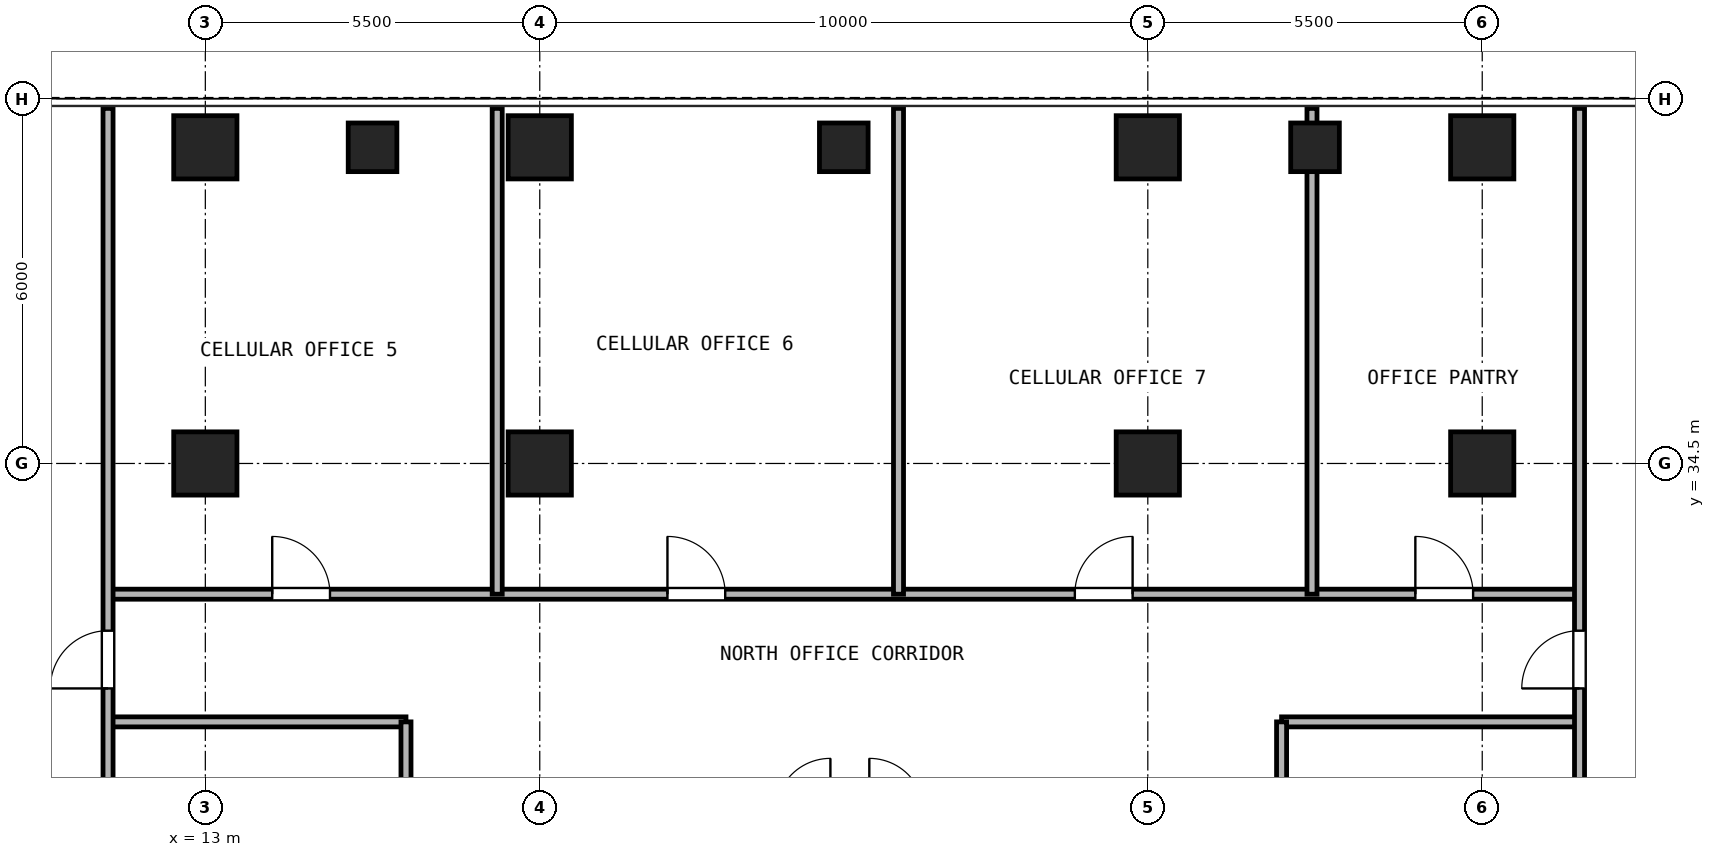
"""IFC4 building model, lengths in metres.
Left out: names, types, materials, properties, quantities, classifications, styles, units other than length and angle.
Written with IfcOpenShell. Run it as: python <this file> out.ifc"""

import sys

from ifc_helpers import new_model, si_unit, direction, frame, frame_2d, origin, origin_2d, place, context, subcontext, project, spatial, rectangle, hollow_rectangle, extrude, source, transform, mapped, element, fill, save


model = new_model("IFC4")
c1 = context("Model", 3, precision=1e-05, world=origin(), true_north=direction((0.0, 1.0)))
c2 = subcontext(c1, "Body", "Model", "MODEL_VIEW")
j1 = project(units=[si_unit("LENGTHUNIT", "METRE"), si_unit("PLANEANGLEUNIT", "RADIAN")], contexts=[c1])
p1 = place(None, origin())
s1 = spatial("IfcSite", under=j1, at=p1, CompositionType="ELEMENT")
p2 = place(p1, origin())
s2 = spatial("IfcBuilding", under=s1, at=p2, CompositionType="ELEMENT")
p3 = place(p2, frame((0.0, 0.0, 33.3)))
s3 = spatial("IfcBuildingStorey", under=s2, at=p3, CompositionType="ELEMENT", Elevation=33.3)
m1 = source(origin(), c2, "Body", "SweptSolid", [
    extrude(hollow_rectangle(XDim=1.04, YDim=1.04, WallThickness=0.065, at=origin_2d()), origin(), (0.0, 0.0, 1.0), 3.32),
])
for number, where, z_axis, x_axis in (
    (1, (13.0, 39.7, 0.0), (0.0, 0.0, 1.0), (1.0, 0.0, 0.0)),
    (2, (18.5, 39.7, 0.0), (0.0, 0.0, 1.0), (1.0, 0.0, 0.0)),
    (3, (28.5, 39.7, 0.0), (0.0, 0.0, 1.0), (1.0, 0.0, 0.0)),
    (4, (34.0, 39.7, 0.0), (0.0, 0.0, 1.0), (1.0, 0.0, 0.0)),
    (5, (13.0, 34.5, 0.0), (0.0, 0.0, 1.0), (1.0, 0.0, 0.0)),
    (6, (18.5, 34.5, 0.0), (0.0, 0.0, 1.0), (1.0, 0.0, 0.0)),
    (7, (28.5, 34.5, 0.0), (0.0, 0.0, 1.0), (1.0, 0.0, 0.0)),
    (8, (34.0, 34.5, 0.0), (0.0, 0.0, 1.0), (1.0, 0.0, 0.0)),
):
    element("IfcColumn", number, at=place(p3, frame(where, z_axis=z_axis, x_axis=x_axis)), inside=s3, PredefinedType="COLUMN", context=c2, shape_type="MappedRepresentation", body=[
        mapped(m1, transform((0.0, 0.0, 0.0), x_axis=(1.0, 0.0, 0.0), y_axis=(0.0, 1.0, 0.0), z_axis=(0.0, 0.0, 1.0), scale=1.0)),
    ])
m2 = source(origin(), c2, "Body", "SweptSolid", [
    extrude(hollow_rectangle(XDim=0.8, YDim=0.8, WallThickness=0.045, at=origin_2d()), origin(), (0.0, 0.0, 1.0), 3.32),
])
for number, where, z_axis, x_axis in (
    (9, (15.75, 39.7, 0.0), (0.0, 0.0, 1.0), (1.0, 0.0, 0.0)),
    (10, (23.5, 39.7, 0.0), (0.0, 0.0, 1.0), (1.0, 0.0, 0.0)),
    (11, (31.25, 39.7, 0.0), (0.0, 0.0, 1.0), (1.0, 0.0, 0.0)),
):
    element("IfcColumn", number, at=place(p3, frame(where, z_axis=z_axis, x_axis=x_axis)), inside=s3, PredefinedType="COLUMN", context=c2, shape_type="MappedRepresentation", body=[
        mapped(m2, transform((0.0, 0.0, 0.0), x_axis=(1.0, 0.0, 0.0), y_axis=(0.0, 1.0, 0.0), z_axis=(0.0, 0.0, 1.0), scale=1.0)),
    ])
p4 = place(p3, frame((11.4, 32.35, 0.0), z_axis=(0.0, 0.0, 1.0), x_axis=(1.0, 0.0, 0.0)))
e12 = element("IfcWall", 12, at=p4, inside=s3, PredefinedType="PARTITIONING", context=c2, shape_type="SweptSolid", body=[
    extrude(rectangle(XDim=24.2, YDim=0.165, at=frame_2d((12.1, 0.0))), origin(), (0.0, 0.0, 1.0), 3.32),
])
p5 = place(p4, frame((2.7, 0.0, 0.0)))
e13 = element("IfcOpeningElement", 13, at=p5, cuts=e12, PredefinedType="OPENING", context=c2, shape_type="SweptSolid", body=[
    extrude(rectangle(XDim=0.95, YDim=2.15, at=frame_2d((0.475, 1.075))), frame((0.0, 0.093, 0.0), z_axis=(0.0, -1.0, 0.0), x_axis=(1.0, 0.0, 0.0)), (0.0, 0.0, 1.0), 0.185),
])
p6 = place(p4, frame((9.2, 0.0, 0.0)))
e14 = element("IfcOpeningElement", 14, at=p6, cuts=e12, PredefinedType="OPENING", context=c2, shape_type="SweptSolid", body=[
    extrude(rectangle(XDim=0.95, YDim=2.15, at=frame_2d((0.475, 1.075))), frame((0.0, 0.093, 0.0), z_axis=(0.0, -1.0, 0.0), x_axis=(1.0, 0.0, 0.0)), (0.0, 0.0, 1.0), 0.185),
])
p7 = place(p4, frame((15.9, 0.0, 0.0)))
e15 = element("IfcOpeningElement", 15, at=p7, cuts=e12, PredefinedType="OPENING", context=c2, shape_type="SweptSolid", body=[
    extrude(rectangle(XDim=0.95, YDim=2.15, at=frame_2d((0.475, 1.075))), frame((0.0, 0.093, 0.0), z_axis=(0.0, -1.0, 0.0), x_axis=(1.0, 0.0, 0.0)), (0.0, 0.0, 1.0), 0.185),
])
p8 = place(p4, frame((21.5, 0.0, 0.0)))
e16 = element("IfcOpeningElement", 16, at=p8, cuts=e12, PredefinedType="OPENING", context=c2, shape_type="SweptSolid", body=[
    extrude(rectangle(XDim=0.95, YDim=2.15, at=frame_2d((0.475, 1.075))), frame((0.0, 0.093, 0.0), z_axis=(0.0, -1.0, 0.0), x_axis=(1.0, 0.0, 0.0)), (0.0, 0.0, 1.0), 0.185),
])
for number, where, z_axis, x_axis in (
    (17, (11.4, 30.25, 0.0), (0.0, 0.0, 1.0), (1.0, 0.0, 0.0)),
    (18, (30.7, 30.25, 0.0), (0.0, 0.0, 1.0), (1.0, 0.0, 0.0)),
):
    element("IfcWall", number, at=place(p3, frame(where, z_axis=z_axis, x_axis=x_axis)), inside=s3, PredefinedType="PARTITIONING", context=c2, shape_type="SweptSolid", body=[
        extrude(rectangle(XDim=4.9, YDim=0.165, at=frame_2d((2.45, 0.0))), origin(), (0.0, 0.0, 1.0), 3.32),
    ])
p9 = place(p3, frame((16.3, 9.45, 0.0), z_axis=(0.0, 0.0, 1.0), x_axis=(0.0, 1.0, 0.0)))
e19 = element("IfcWall", 19, at=p9, inside=s3, PredefinedType="PARTITIONING", context=c2, shape_type="SweptSolid", body=[
    extrude(rectangle(XDim=20.8, YDim=0.165, at=frame_2d((10.4, 0.0))), origin(), (0.0, 0.0, 1.0), 3.32),
])
p10 = place(p9, frame((6.2, 0.0, 0.0)))
e20 = element("IfcOpeningElement", 20, at=p10, cuts=e19, PredefinedType="OPENING", context=c2, shape_type="SweptSolid", body=[
    extrude(rectangle(XDim=0.95, YDim=2.15, at=frame_2d((0.475, 1.075))), frame((0.0, 0.093, 0.0), z_axis=(0.0, -1.0, 0.0), x_axis=(1.0, 0.0, 0.0)), (0.0, 0.0, 1.0), 0.185),
])
p11 = place(p9, frame((16.6, 0.0, 0.0)))
e21 = element("IfcOpeningElement", 21, at=p11, cuts=e19, PredefinedType="OPENING", context=c2, shape_type="SweptSolid", body=[
    extrude(rectangle(XDim=0.95, YDim=2.15, at=frame_2d((0.475, 1.075))), frame((0.0, 0.093, 0.0), z_axis=(0.0, -1.0, 0.0), x_axis=(1.0, 0.0, 0.0)), (0.0, 0.0, 1.0), 0.185),
])
p12 = place(p3, frame((30.7, 9.45, 0.0), z_axis=(0.0, 0.0, 1.0), x_axis=(0.0, 1.0, 0.0)))
e22 = element("IfcWall", 22, at=p12, inside=s3, PredefinedType="PARTITIONING", context=c2, shape_type="SweptSolid", body=[
    extrude(rectangle(XDim=20.8, YDim=0.165, at=frame_2d((10.4, 0.0))), origin(), (0.0, 0.0, 1.0), 3.32),
])
p13 = place(p12, frame((9.9, 0.0, 0.0)))
e23 = element("IfcOpeningElement", 23, at=p13, cuts=e22, PredefinedType="OPENING", context=c2, shape_type="SweptSolid", body=[
    extrude(rectangle(XDim=0.95, YDim=2.15, at=frame_2d((0.475, 1.075))), frame((0.0, 0.093, 0.0), z_axis=(0.0, -1.0, 0.0), x_axis=(1.0, 0.0, 0.0)), (0.0, 0.0, 1.0), 0.185),
])
p14 = place(p3, frame((11.4, 0.16, 0.0), z_axis=(0.0, 0.0, 1.0), x_axis=(0.0, 1.0, 0.0)))
e24 = element("IfcWall", 24, at=p14, inside=s3, PredefinedType="PARTITIONING", context=c2, shape_type="SweptSolid", body=[
    extrude(rectangle(XDim=40.18, YDim=0.165, at=frame_2d((20.09, 0.0))), origin(), (0.0, 0.0, 1.0), 3.32),
])
p15 = place(p14, frame((7.74, 0.0, 0.0)))
e25 = element("IfcOpeningElement", 25, at=p15, cuts=e24, PredefinedType="OPENING", context=c2, shape_type="SweptSolid", body=[
    extrude(rectangle(XDim=0.95, YDim=2.15, at=frame_2d((0.475, 1.075))), frame((0.0, 0.093, 0.0), z_axis=(0.0, -1.0, 0.0), x_axis=(1.0, 0.0, 0.0)), (0.0, 0.0, 1.0), 0.185),
])
p16 = place(p14, frame((30.64, 0.0, 0.0)))
e26 = element("IfcOpeningElement", 26, at=p16, cuts=e24, PredefinedType="OPENING", context=c2, shape_type="SweptSolid", body=[
    extrude(rectangle(XDim=0.95, YDim=2.15, at=frame_2d((0.475, 1.075))), frame((0.0, 0.093, 0.0), z_axis=(0.0, -1.0, 0.0), x_axis=(1.0, 0.0, 0.0)), (0.0, 0.0, 1.0), 0.185),
])
p17 = place(p3, frame((35.6, 0.16, 0.0), z_axis=(0.0, 0.0, 1.0), x_axis=(0.0, 1.0, 0.0)))
e27 = element("IfcWall", 27, at=p17, inside=s3, PredefinedType="PARTITIONING", context=c2, shape_type="SweptSolid", body=[
    extrude(rectangle(XDim=40.18, YDim=0.165, at=frame_2d((20.09, 0.0))), origin(), (0.0, 0.0, 1.0), 3.32),
])
p18 = place(p17, frame((7.74, 0.0, 0.0)))
e28 = element("IfcOpeningElement", 28, at=p18, cuts=e27, PredefinedType="OPENING", context=c2, shape_type="SweptSolid", body=[
    extrude(rectangle(XDim=0.95, YDim=2.15, at=frame_2d((0.475, 1.075))), frame((0.0, 0.093, 0.0), z_axis=(0.0, -1.0, 0.0), x_axis=(1.0, 0.0, 0.0)), (0.0, 0.0, 1.0), 0.185),
])
p19 = place(p17, frame((30.64, 0.0, 0.0)))
e29 = element("IfcOpeningElement", 29, at=p19, cuts=e27, PredefinedType="OPENING", context=c2, shape_type="SweptSolid", body=[
    extrude(rectangle(XDim=0.95, YDim=2.15, at=frame_2d((0.475, 1.075))), frame((0.0, 0.093, 0.0), z_axis=(0.0, -1.0, 0.0), x_axis=(1.0, 0.0, 0.0)), (0.0, 0.0, 1.0), 0.185),
])
for number, where, z_axis, x_axis in (
    (30, (17.8, 32.35, 0.0), (0.0, 0.0, 1.0), (0.0, 1.0, 0.0)),
    (31, (24.4, 32.35, 0.0), (0.0, 0.0, 1.0), (0.0, 1.0, 0.0)),
    (32, (31.2, 32.35, 0.0), (0.0, 0.0, 1.0), (0.0, 1.0, 0.0)),
):
    element("IfcWall", number, at=place(p3, frame(where, z_axis=z_axis, x_axis=x_axis)), inside=s3, PredefinedType="PARTITIONING", context=c2, shape_type="SweptSolid", body=[
        extrude(rectangle(XDim=7.99, YDim=0.165, at=frame_2d((3.995, 0.0))), origin(), (0.0, 0.0, 1.0), 3.32),
    ])
p20 = place(p5, origin())
e33 = element("IfcDoor", 33, at=p20, inside=s3, OperationType="SINGLE_SWING_LEFT", PredefinedType="DOOR", context=c2, shape_type="SweptSolid", body=[
    extrude(rectangle(XDim=0.95, YDim=2.15, at=frame_2d((0.475, 1.075))), frame((0.0, 0.025, 0.0), z_axis=(0.0, -1.0, 0.0), x_axis=(1.0, 0.0, 0.0)), (0.0, 0.0, 1.0), 0.05),
])
fill(e13, e33)
p21 = place(p6, origin())
e34 = element("IfcDoor", 34, at=p21, inside=s3, OperationType="SINGLE_SWING_LEFT", PredefinedType="DOOR", context=c2, shape_type="SweptSolid", body=[
    extrude(rectangle(XDim=0.95, YDim=2.15, at=frame_2d((0.475, 1.075))), frame((0.0, 0.025, 0.0), z_axis=(0.0, -1.0, 0.0), x_axis=(1.0, 0.0, 0.0)), (0.0, 0.0, 1.0), 0.05),
])
fill(e14, e34)
p22 = place(p7, origin())
e35 = element("IfcDoor", 35, at=p22, inside=s3, OperationType="SINGLE_SWING_RIGHT", PredefinedType="DOOR", context=c2, shape_type="SweptSolid", body=[
    extrude(rectangle(XDim=0.95, YDim=2.15, at=frame_2d((0.475, 1.075))), frame((0.0, 0.025, 0.0), z_axis=(0.0, -1.0, 0.0), x_axis=(1.0, 0.0, 0.0)), (0.0, 0.0, 1.0), 0.05),
])
fill(e15, e35)
p23 = place(p8, origin())
e36 = element("IfcDoor", 36, at=p23, inside=s3, OperationType="SINGLE_SWING_LEFT", PredefinedType="DOOR", context=c2, shape_type="SweptSolid", body=[
    extrude(rectangle(XDim=0.95, YDim=2.15, at=frame_2d((0.475, 1.075))), frame((0.0, 0.025, 0.0), z_axis=(0.0, -1.0, 0.0), x_axis=(1.0, 0.0, 0.0)), (0.0, 0.0, 1.0), 0.05),
])
fill(e16, e36)
p24 = place(p16, frame((0.95, 0.0, 0.0), z_axis=(0.0, 0.0, 1.0), x_axis=(-1.0, 0.0, 0.0)))
e37 = element("IfcDoor", 37, at=p24, inside=s3, OperationType="SINGLE_SWING_LEFT", PredefinedType="DOOR", context=c2, shape_type="SweptSolid", body=[
    extrude(rectangle(XDim=0.95, YDim=2.15, at=frame_2d((0.475, 1.075))), frame((0.0, 0.025, 0.0), z_axis=(0.0, -1.0, 0.0), x_axis=(1.0, 0.0, 0.0)), (0.0, 0.0, 1.0), 0.05),
])
fill(e26, e37)
p25 = place(p19, origin())
e38 = element("IfcDoor", 38, at=p25, inside=s3, OperationType="SINGLE_SWING_LEFT", PredefinedType="DOOR", context=c2, shape_type="SweptSolid", body=[
    extrude(rectangle(XDim=0.95, YDim=2.15, at=frame_2d((0.475, 1.075))), frame((0.0, 0.025, 0.0), z_axis=(0.0, -1.0, 0.0), x_axis=(1.0, 0.0, 0.0)), (0.0, 0.0, 1.0), 0.05),
])
fill(e29, e38)
save(model, sys.argv[1])
